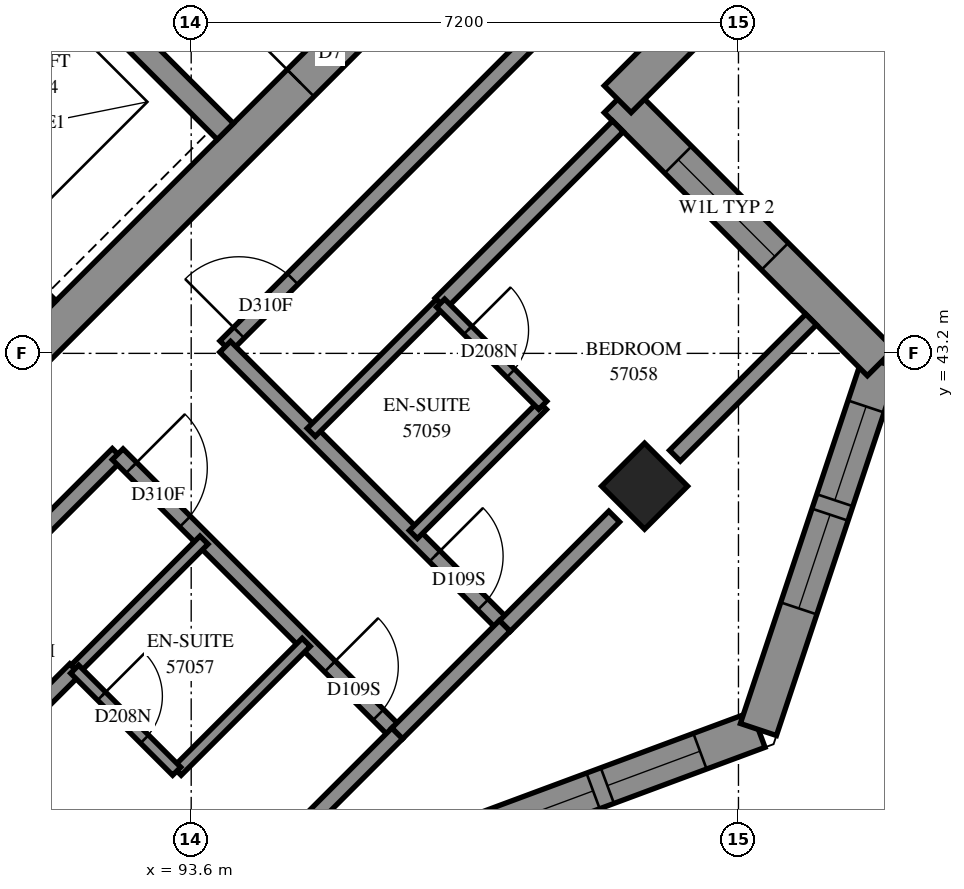
"""IFC4 building model, lengths in metres.
Left out: names, types, materials, properties, quantities, classifications, styles, units other than length and angle.
Written with IfcOpenShell. Run it as: python <this file> out.ifc"""

import sys

from ifc_helpers import new_model, si_unit, direction, frame, frame_2d, origin, origin_2d, place, context, subcontext, project, spatial, polyline, rectangle, outline, extrude, element, fill, save


model = new_model("IFC4")
c1 = context("Model", 3, precision=1e-05, world=origin(), true_north=direction((0.0, 1.0)))
c2 = subcontext(c1, "Body", "Model", "MODEL_VIEW")
j1 = project(units=[si_unit("LENGTHUNIT", "METRE"), si_unit("PLANEANGLEUNIT", "RADIAN")], contexts=[c1])
p1 = place(None, origin())
s1 = spatial("IfcSite", under=j1, at=p1, CompositionType="ELEMENT")
p2 = place(p1, origin())
s2 = spatial("IfcBuilding", under=s1, at=p2, CompositionType="ELEMENT")
p3 = place(p2, frame((0.0, 0.0, 210.0)))
s3 = spatial("IfcBuildingStorey", under=s2, at=p3, CompositionType="ELEMENT", Elevation=210.0)
p4 = place(p3, frame((99.565, 41.453, 0.0), z_axis=(0.0, 0.0, 1.0), x_axis=(0.7071067812, -0.7071067812, 0.0)))
e1 = element("IfcColumn", 1, at=p4, inside=s3, PredefinedType="COLUMN", context=c2, shape_type="SweptSolid", body=[
    extrude(rectangle(XDim=0.8, YDim=0.8, at=origin_2d()), origin(), (0.0, 0.0, 1.0), 3.1),
])
p5 = place(p3, frame((87.013, 38.731, -0.3), z_axis=(0.0, 0.0, 1.0), x_axis=(0.7071067812, 0.7071067812, 0.0)))
e2 = element("IfcWall", 2, at=p5, inside=s3, PredefinedType="SHEAR", context=c2, shape_type="SweptSolid", body=[
    extrude(rectangle(XDim=14.4, YDim=0.5, at=frame_2d((7.2, 0.0))), origin(), (0.0, 0.0, 1.0), 2.7),
])
p6 = place(p5, frame((4.55, 0.0, 0.3)))
e3 = element("IfcOpeningElement", 3, at=p6, cuts=e2, PredefinedType="OPENING", context=c2, shape_type="SweptSolid", body=[
    extrude(rectangle(XDim=1.1, YDim=2.1, at=frame_2d((0.55, 1.05))), frame((0.0, 0.26, 0.0), z_axis=(0.0, -1.0, 0.0), x_axis=(1.0, 0.0, 0.0)), (0.0, 0.0, 1.0), 0.52),
])
p7 = place(p5, frame((11.35, 0.0, 0.3)))
e4 = element("IfcOpeningElement", 4, at=p7, cuts=e2, PredefinedType="OPENING", context=c2, shape_type="SweptSolid", body=[
    extrude(rectangle(XDim=1.1, YDim=2.1, at=frame_2d((0.55, 1.05))), frame((0.0, 0.26, 0.0), z_axis=(0.0, -1.0, 0.0), x_axis=(1.0, 0.0, 0.0)), (0.0, 0.0, 1.0), 0.52),
])
p8 = place(p3, frame((81.534, 53.969, 0.0), z_axis=(0.0, 0.0, 1.0), x_axis=(0.707103309, -0.7071102534, 0.0)))
e5 = element("IfcWall", 5, at=p8, inside=s3, PredefinedType="SOLIDWALL", context=c2, shape_type="SweptSolid", body=[
    extrude(rectangle(XDim=14.4, YDim=0.3, at=frame_2d((7.2, 0.0))), origin(), (0.0, 0.0, 1.0), 3.1),
])
p9 = place(p8, frame((1.25, 0.0, 0.0)))
e6 = element("IfcOpeningElement", 6, at=p9, cuts=e5, PredefinedType="OPENING", context=c2, shape_type="SweptSolid", body=[
    extrude(rectangle(XDim=1.1, YDim=2.1, at=frame_2d((0.55, 1.05))), frame((0.0, 0.16, 0.0), z_axis=(0.0, -1.0, 0.0), x_axis=(1.0, 0.0, 0.0)), (0.0, 0.0, 1.0), 0.32),
])
p10 = place(p8, frame((4.85, 0.0, 0.0)))
e7 = element("IfcOpeningElement", 7, at=p10, cuts=e5, PredefinedType="OPENING", context=c2, shape_type="SweptSolid", body=[
    extrude(rectangle(XDim=1.1, YDim=2.1, at=frame_2d((0.55, 1.05))), frame((0.0, 0.16, 0.0), z_axis=(0.0, -1.0, 0.0), x_axis=(1.0, 0.0, 0.0)), (0.0, 0.0, 1.0), 0.32),
])
p11 = place(p8, frame((8.45, 0.0, 0.0)))
e8 = element("IfcOpeningElement", 8, at=p11, cuts=e5, PredefinedType="OPENING", context=c2, shape_type="SweptSolid", body=[
    extrude(rectangle(XDim=1.1, YDim=2.1, at=frame_2d((0.55, 1.05))), frame((0.0, 0.16, 0.0), z_axis=(0.0, -1.0, 0.0), x_axis=(1.0, 0.0, 0.0)), (0.0, 0.0, 1.0), 0.32),
])
p12 = place(p8, frame((12.05, 0.0, 0.0)))
e9 = element("IfcOpeningElement", 9, at=p12, cuts=e5, PredefinedType="OPENING", context=c2, shape_type="SweptSolid", body=[
    extrude(rectangle(XDim=1.1, YDim=2.1, at=frame_2d((0.55, 1.05))), frame((0.0, 0.16, 0.0), z_axis=(0.0, -1.0, 0.0), x_axis=(1.0, 0.0, 0.0)), (0.0, 0.0, 1.0), 0.32),
])
p13 = place(p3, frame((88.958, 51.211, 0.0), z_axis=(0.0, 0.0, 1.0), x_axis=(0.7070998367, -0.7071137256, 0.0)))
e10 = element("IfcWall", 10, at=p13, inside=s3, PredefinedType="SOLIDWALL", context=c2, shape_type="SweptSolid", body=[
    extrude(rectangle(XDim=7.2, YDim=0.3, at=frame_2d((3.6, 0.0))), origin(), (0.0, 0.0, 1.0), 3.1),
])
p14 = place(p3, frame((96.118, 36.415, 0.0), z_axis=(0.0, 0.0, 1.0), x_axis=(0.9374238577, 0.3481903374, 0.0)))
e11 = element("IfcWall", 11, at=p14, inside=s3, PredefinedType="SOLIDWALL", context=c2, shape_type="SweptSolid", body=[
    extrude(outline(polyline([(0.115, -0.25), (5.395, -0.25), (5.155, 0.25), (-0.115, 0.25), (0.115, -0.25)])), origin(), (0.0, 0.0, 1.0), 3.1),
])
p15 = place(p14, frame((1.655, 0.0, 0.45)))
e12 = element("IfcOpeningElement", 12, at=p15, cuts=e11, PredefinedType="OPENING", context=c2, shape_type="SweptSolid", body=[
    extrude(rectangle(XDim=1.3, YDim=2.5, at=frame_2d((0.65, 1.25))), frame((0.0, 0.26, 0.0), z_axis=(0.0, -1.0, 0.0), x_axis=(1.0, 0.0, 0.0)), (0.0, 0.0, 1.0), 0.52),
])
p16 = place(p14, frame((3.155, 0.0, 0.45)))
e13 = element("IfcOpeningElement", 13, at=p16, cuts=e11, PredefinedType="OPENING", context=c2, shape_type="SweptSolid", body=[
    extrude(rectangle(XDim=1.3, YDim=2.5, at=frame_2d((0.65, 1.25))), frame((0.0, 0.26, 0.0), z_axis=(0.0, -1.0, 0.0), x_axis=(1.0, 0.0, 0.0)), (0.0, 0.0, 1.0), 0.52),
])
p17 = place(p3, frame((101.062, 38.252, 0.0), z_axis=(0.0, 0.0, 1.0), x_axis=(0.3162395484, 0.9486793705, 0.0)))
e14 = element("IfcWall", 14, at=p17, inside=s3, PredefinedType="SOLIDWALL", context=c2, shape_type="SweptSolid", body=[
    extrude(outline(polyline([(-0.12, -0.25), (5.247, -0.25), (4.938, 0.25), (0.12, 0.25), (-0.12, -0.25)])), origin(), (0.0, 0.0, 1.0), 3.1),
])
p18 = place(p17, frame((1.68, 0.0, 0.45)))
e15 = element("IfcOpeningElement", 15, at=p18, cuts=e14, PredefinedType="OPENING", context=c2, shape_type="SweptSolid", body=[
    extrude(rectangle(XDim=1.3, YDim=2.5, at=frame_2d((0.65, 1.25))), frame((0.0, 0.26, 0.0), z_axis=(0.0, -1.0, 0.0), x_axis=(1.0, 0.0, 0.0)), (0.0, 0.0, 1.0), 0.52),
])
p19 = place(p17, frame((3.18, 0.0, 0.45)))
e16 = element("IfcOpeningElement", 16, at=p19, cuts=e14, PredefinedType="OPENING", context=c2, shape_type="SweptSolid", body=[
    extrude(rectangle(XDim=1.3, YDim=2.5, at=frame_2d((0.65, 1.25))), frame((0.0, 0.26, 0.0), z_axis=(0.0, -1.0, 0.0), x_axis=(1.0, 0.0, 0.0)), (0.0, 0.0, 1.0), 0.52),
])
p20 = place(p3, frame((102.673, 43.083, 0.0), z_axis=(0.0, 0.0, 1.0), x_axis=(-0.7071067812, 0.7071067812, 0.0)))
e17 = element("IfcWall", 17, at=p20, inside=s3, PredefinedType="SOLIDWALL", context=c2, shape_type="SweptSolid", body=[
    extrude(outline(polyline([(-0.154, -0.25), (4.646, -0.25), (5.146, 0.25), (0.154, 0.25), (-0.154, -0.25)])), origin(), (0.0, 0.0, 1.0), 3.1),
])
p21 = place(p20, frame((1.97, 0.0, 0.6)))
e18 = element("IfcOpeningElement", 18, at=p21, cuts=e17, PredefinedType="OPENING", context=c2, shape_type="SweptSolid", body=[
    extrude(rectangle(XDim=1.8, YDim=1.9, at=frame_2d((0.9, 0.95))), frame((0.0, 0.26, 0.0), z_axis=(0.0, -1.0, 0.0), x_axis=(1.0, 0.0, 0.0)), (0.0, 0.0, 1.0), 0.52),
])
p22 = place(p3, frame((99.211, 46.544, 0.0), z_axis=(0.0, 0.0, 1.0), x_axis=(0.7071067812, 0.7071067812, 0.0)))
e19 = element("IfcWall", 19, at=p22, inside=s3, PredefinedType="SOLIDWALL", context=c2, shape_type="SweptSolid", body=[
    extrude(outline(polyline([(0.25, -0.25), (6.132, -0.25), (5.444, 0.25), (-0.25, 0.25), (0.25, -0.25)])), origin(), (0.0, 0.0, 1.0), 3.1),
])
p23 = place(p22, frame((1.125, 0.0, 0.6)))
e20 = element("IfcOpeningElement", 20, at=p23, cuts=e19, PredefinedType="OPENING", context=c2, shape_type="SweptSolid", body=[
    extrude(rectangle(XDim=1.8, YDim=1.9, at=frame_2d((0.9, 0.95))), frame((0.0, 0.26, 0.0), z_axis=(0.0, -1.0, 0.0), x_axis=(1.0, 0.0, 0.0)), (0.0, 0.0, 1.0), 0.52),
])
p24 = place(p3, frame((85.002, 31.976, 0.0), z_axis=(0.0, 0.0, 1.0), x_axis=(0.7072267874, 0.7069867546, 0.0)))
e21 = element("IfcWall", 21, at=p24, inside=s3, PredefinedType="PARTITIONING", context=c2, shape_type="SweptSolid", body=[
    extrude(rectangle(XDim=9.999, YDim=0.2, at=frame_2d((4.999, 0.0))), origin(), (0.0, 0.0, 1.0), 3.1),
])
p25 = place(p3, frame((94.049, 43.293, 0.0), z_axis=(0.0, 0.0, 1.0), x_axis=(0.7071067812, 0.7071067812, 0.0)))
e22 = element("IfcWall", 22, at=p25, inside=s3, PredefinedType="PARTITIONING", context=c2, shape_type="SweptSolid", body=[
    extrude(rectangle(XDim=8.2, YDim=0.2, at=frame_2d((4.1, 0.0))), origin(), (0.0, 0.0, 1.0), 3.1),
])
p26 = place(p25, frame((0.252, 0.0, 0.0)))
e23 = element("IfcOpeningElement", 23, at=p26, cuts=e22, PredefinedType="OPENING", context=c2, shape_type="SweptSolid", body=[
    extrude(rectangle(XDim=1.0, YDim=2.1, at=frame_2d((0.5, 1.05))), frame((0.0, 0.11, 0.0), z_axis=(0.0, -1.0, 0.0), x_axis=(1.0, 0.0, 0.0)), (0.0, 0.0, 1.0), 0.22),
])
p27 = place(p3, frame((86.835, 36.079, 0.0), z_axis=(0.0, 0.0, 1.0), x_axis=(0.7071067812, 0.7071067812, 0.0)))
e24 = element("IfcWall", 24, at=p27, inside=s3, PredefinedType="PARTITIONING", context=c2, shape_type="SweptSolid", body=[
    extrude(rectangle(XDim=8.2, YDim=0.2, at=frame_2d((4.1, 0.0))), origin(), (0.0, 0.0, 1.0), 3.1),
])
p28 = place(p3, frame((94.047, 43.287, 0.0), z_axis=(0.0, 0.0, 1.0), x_axis=(0.7071067812, -0.7071067812, 0.0)))
e25 = element("IfcWall", 25, at=p28, inside=s3, PredefinedType="PARTITIONING", context=c2, shape_type="SweptSolid", body=[
    extrude(rectangle(XDim=5.199, YDim=0.2, at=frame_2d((2.599, 0.0))), origin(), (0.0, 0.0, 1.0), 3.1),
])
p29 = place(p28, frame((3.898, 0.0, 0.0)))
e26 = element("IfcOpeningElement", 26, at=p29, cuts=e25, PredefinedType="OPENING", context=c2, shape_type="SweptSolid", body=[
    extrude(rectangle(XDim=0.9, YDim=2.1, at=frame_2d((0.45, 1.05))), frame((0.0, 0.11, 0.0), z_axis=(0.0, -1.0, 0.0), x_axis=(1.0, 0.0, 0.0)), (0.0, 0.0, 1.0), 0.22),
])
p30 = place(p3, frame((92.633, 41.873, 0.0), z_axis=(0.0, 0.0, 1.0), x_axis=(0.7071067812, -0.7071067812, 0.0)))
e27 = element("IfcWall", 27, at=p30, inside=s3, PredefinedType="PARTITIONING", context=c2, shape_type="SweptSolid", body=[
    extrude(rectangle(XDim=5.199, YDim=0.2, at=frame_2d((2.599, 0.0))), origin(), (0.0, 0.0, 1.0), 3.1),
])
p31 = place(p30, frame((0.253, 0.0, 0.0)))
e28 = element("IfcOpeningElement", 28, at=p31, cuts=e27, PredefinedType="OPENING", context=c2, shape_type="SweptSolid", body=[
    extrude(rectangle(XDim=1.0, YDim=2.1, at=frame_2d((0.5, 1.05))), frame((0.0, 0.11, 0.0), z_axis=(0.0, -1.0, 0.0), x_axis=(1.0, 0.0, 0.0)), (0.0, 0.0, 1.0), 0.22),
])
p32 = place(p30, frame((3.948, 0.0, 0.0)))
e29 = element("IfcOpeningElement", 29, at=p32, cuts=e27, PredefinedType="OPENING", context=c2, shape_type="SweptSolid", body=[
    extrude(rectangle(XDim=0.9, YDim=2.1, at=frame_2d((0.45, 1.05))), frame((0.0, 0.11, 0.0), z_axis=(0.0, -1.0, 0.0), x_axis=(1.0, 0.0, 0.0)), (0.0, 0.0, 1.0), 0.22),
])
p33 = place(p3, frame((96.88, 43.856, 0.0), z_axis=(0.0, 0.0, 1.0), x_axis=(0.7074098182, 0.7068036142, 0.0)))
e30 = element("IfcWall", 30, at=p33, inside=s3, PredefinedType="PARTITIONING", context=c2, shape_type="SweptSolid", body=[
    extrude(rectangle(XDim=3.299, YDim=0.2, at=frame_2d((1.65, 0.0))), origin(), (0.0, 0.0, 1.0), 3.1),
])
p34 = place(p3, frame((99.964, 41.854, 0.0), z_axis=(0.0, 0.0, 1.0), x_axis=(0.7071265121, 0.7070870497, 0.0)))
e31 = element("IfcWall", 31, at=p34, inside=s3, PredefinedType="PARTITIONING", context=c2, shape_type="SweptSolid", body=[
    extrude(rectangle(XDim=2.534, YDim=0.2, at=frame_2d((1.267, 0.0))), origin(), (0.0, 0.0, 1.0), 3.1),
])
for number, where, z_axis, x_axis in (
    (32, (96.523, 40.817, 0.0), (0.0, 0.0, 1.0), (0.707, 0.707, 0.0)),
    (33, (95.179, 42.161, 0.0), (0.0, 0.0, 1.0), (0.707, 0.707, 0.0)),
):
    element("IfcWall", number, at=place(p3, frame(where, z_axis=z_axis, x_axis=x_axis)), inside=s3, PredefinedType="PARTITIONING", context=c2, shape_type="SweptSolid", body=[
        extrude(rectangle(XDim=2.401, YDim=0.15, at=frame_2d((1.201, 0.0))), origin(), (0.0, 0.0, 1.0), 3.1),
    ])
for number, where, z_axis, x_axis in (
    (34, (92.072, 39.046, 0.0), (0.0, 0.0, 1.0), (0.707, 0.708, 0.0)),
    (35, (93.415, 37.703, 0.0), (0.0, 0.0, 1.0), (0.708, 0.707, 0.0)),
):
    element("IfcWall", number, at=place(p3, frame(where, z_axis=z_axis, x_axis=x_axis)), inside=s3, PredefinedType="PARTITIONING", context=c2, shape_type="SweptSolid", body=[
        extrude(rectangle(XDim=2.4, YDim=0.15, at=frame_2d((1.2, 0.0))), origin(), (0.0, 0.0, 1.0), 3.1),
    ])
p35 = place(p3, frame((97.727, 39.613, 0.0), z_axis=(0.0, 0.0, 1.0), x_axis=(0.7066152229, 0.7075979979, 0.0)))
e36 = element("IfcWall", 36, at=p35, inside=s3, PredefinedType="PARTITIONING", context=c2, shape_type="SweptSolid", body=[
    extrude(rectangle(XDim=2.035, YDim=0.2, at=frame_2d((1.018, 0.0))), origin(), (0.0, 0.0, 1.0), 2.6),
])
p36 = place(p3, frame((94.873, 36.763, 0.0), z_axis=(0.0, 0.0, 1.0), x_axis=(0.7071067812, 0.7071067812, 0.0)))
e37 = element("IfcWall", 37, at=p36, inside=s3, PredefinedType="PARTITIONING", context=c2, shape_type="SweptSolid", body=[
    extrude(rectangle(XDim=2.034, YDim=0.2, at=frame_2d((1.017, 0.0))), origin(), (0.0, 0.0, 1.0), 2.6),
])
p37 = place(p3, frame((96.311, 38.201, 0.0), z_axis=(0.0, 0.0, 1.0), x_axis=(0.7071067812, 0.7071067812, 0.0)))
e38 = element("IfcWall", 38, at=p37, inside=s3, PredefinedType="PARTITIONING", context=c2, shape_type="SweptSolid", body=[
    extrude(rectangle(XDim=2.0, YDim=0.2, at=frame_2d((1.0, 0.0))), origin(), (0.0, 0.0, 1.0), 2.6),
])
p38 = place(p3, frame((96.881, 43.861, 0.0), z_axis=(0.0, 0.0, 1.0), x_axis=(0.7071067812, -0.7071067812, 0.0)))
e39 = element("IfcWall", 39, at=p38, inside=s3, PredefinedType="PARTITIONING", context=c2, shape_type="SweptSolid", body=[
    extrude(rectangle(XDim=1.901, YDim=0.15, at=frame_2d((0.95, 0.0))), origin(), (0.0, 0.0, 1.0), 3.1),
])
p39 = place(p38, frame((0.505, 0.0, 0.0)))
e40 = element("IfcOpeningElement", 40, at=p39, cuts=e39, PredefinedType="OPENING", context=c2, shape_type="SweptSolid", body=[
    extrude(rectangle(XDim=0.8, YDim=2.1, at=frame_2d((0.4, 1.05))), frame((0.0, 0.085, 0.0), z_axis=(0.0, -1.0, 0.0), x_axis=(1.0, 0.0, 0.0)), (0.0, 0.0, 1.0), 0.17),
])
p40 = place(p3, frame((92.067, 39.045, 0.0), z_axis=(0.0, 0.0, 1.0), x_axis=(0.7071067812, -0.7071067812, 0.0)))
e41 = element("IfcWall", 41, at=p40, inside=s3, PredefinedType="PARTITIONING", context=c2, shape_type="SweptSolid", body=[
    extrude(rectangle(XDim=1.898, YDim=0.15, at=frame_2d((0.949, 0.0))), origin(), (0.0, 0.0, 1.0), 3.1),
])
p41 = place(p40, frame((0.501, 0.0, 0.0)))
e42 = element("IfcOpeningElement", 42, at=p41, cuts=e41, PredefinedType="OPENING", context=c2, shape_type="SweptSolid", body=[
    extrude(rectangle(XDim=0.8, YDim=2.1, at=frame_2d((0.4, 1.05))), frame((0.0, 0.085, 0.0), z_axis=(0.0, -1.0, 0.0), x_axis=(1.0, 0.0, 0.0)), (0.0, 0.0, 1.0), 0.17),
])
p42 = place(p15, origin())
e43 = element("IfcWindow", 43, at=p42, inside=s3, PartitioningType="SINGLE_PANEL", PredefinedType="WINDOW", context=c2, shape_type="SweptSolid", body=[
    extrude(rectangle(XDim=1.3, YDim=2.5, at=frame_2d((0.65, 1.25))), frame((0.0, 0.18, 0.0), z_axis=(0.0, -1.0, 0.0), x_axis=(1.0, 0.0, 0.0)), (0.0, 0.0, 1.0), 0.06),
])
fill(e12, e43)
p43 = place(p16, origin())
e44 = element("IfcWindow", 44, at=p43, inside=s3, PartitioningType="SINGLE_PANEL", PredefinedType="WINDOW", context=c2, shape_type="SweptSolid", body=[
    extrude(rectangle(XDim=1.3, YDim=2.5, at=frame_2d((0.65, 1.25))), frame((0.0, 0.18, 0.0), z_axis=(0.0, -1.0, 0.0), x_axis=(1.0, 0.0, 0.0)), (0.0, 0.0, 1.0), 0.06),
])
fill(e13, e44)
p44 = place(p18, origin())
e45 = element("IfcWindow", 45, at=p44, inside=s3, PartitioningType="SINGLE_PANEL", PredefinedType="WINDOW", context=c2, shape_type="SweptSolid", body=[
    extrude(rectangle(XDim=1.3, YDim=2.5, at=frame_2d((0.65, 1.25))), frame((0.0, 0.18, 0.0), z_axis=(0.0, -1.0, 0.0), x_axis=(1.0, 0.0, 0.0)), (0.0, 0.0, 1.0), 0.06),
])
fill(e15, e45)
p45 = place(p19, origin())
e46 = element("IfcWindow", 46, at=p45, inside=s3, PartitioningType="SINGLE_PANEL", PredefinedType="WINDOW", context=c2, shape_type="SweptSolid", body=[
    extrude(rectangle(XDim=1.3, YDim=2.5, at=frame_2d((0.65, 1.25))), frame((0.0, 0.18, 0.0), z_axis=(0.0, -1.0, 0.0), x_axis=(1.0, 0.0, 0.0)), (0.0, 0.0, 1.0), 0.06),
])
fill(e16, e46)
p46 = place(p21, origin())
e47 = element("IfcWindow", 47, at=p46, inside=s3, PartitioningType="SINGLE_PANEL", PredefinedType="WINDOW", context=c2, shape_type="SweptSolid", body=[
    extrude(rectangle(XDim=1.8, YDim=1.9, at=frame_2d((0.9, 0.95))), frame((0.0, 0.18, 0.0), z_axis=(0.0, -1.0, 0.0), x_axis=(1.0, 0.0, 0.0)), (0.0, 0.0, 1.0), 0.06),
])
fill(e18, e47)
p47 = place(p7, origin())
e48 = element("IfcDoor", 48, at=p47, inside=s3, OperationType="SINGLE_SWING_RIGHT", PredefinedType="DOOR", context=c2, shape_type="SweptSolid", body=[
    extrude(rectangle(XDim=1.1, YDim=2.1, at=frame_2d((0.55, 1.05))), frame((0.0, 0.025, 0.0), z_axis=(0.0, -1.0, 0.0), x_axis=(1.0, 0.0, 0.0)), (0.0, 0.0, 1.0), 0.05),
])
fill(e4, e48)
p48 = place(p26, origin())
e49 = element("IfcDoor", 49, at=p48, inside=s3, OperationType="SINGLE_SWING_RIGHT", PredefinedType="DOOR", context=c2, shape_type="SweptSolid", body=[
    extrude(rectangle(XDim=1.0, YDim=2.1, at=frame_2d((0.5, 1.05))), frame((0.0, 0.025, 0.0), z_axis=(0.0, -1.0, 0.0), x_axis=(1.0, 0.0, 0.0)), (0.0, 0.0, 1.0), 0.05),
])
fill(e23, e49)
p49 = place(p31, origin())
e50 = element("IfcDoor", 50, at=p49, inside=s3, OperationType="SINGLE_SWING_RIGHT", PredefinedType="DOOR", context=c2, shape_type="SweptSolid", body=[
    extrude(rectangle(XDim=1.0, YDim=2.1, at=frame_2d((0.5, 1.05))), frame((0.0, 0.025, 0.0), z_axis=(0.0, -1.0, 0.0), x_axis=(1.0, 0.0, 0.0)), (0.0, 0.0, 1.0), 0.05),
])
fill(e28, e50)
p50 = place(p32, origin())
e51 = element("IfcDoor", 51, at=p50, inside=s3, OperationType="SINGLE_SWING_LEFT", PredefinedType="DOOR", context=c2, shape_type="SweptSolid", body=[
    extrude(rectangle(XDim=0.9, YDim=2.1, at=frame_2d((0.45, 1.05))), frame((0.0, 0.025, 0.0), z_axis=(0.0, -1.0, 0.0), x_axis=(1.0, 0.0, 0.0)), (0.0, 0.0, 1.0), 0.05),
])
fill(e29, e51)
p51 = place(p41, origin())
e52 = element("IfcDoor", 52, at=p51, inside=s3, OperationType="SINGLE_SWING_RIGHT", PredefinedType="DOOR", context=c2, shape_type="SweptSolid", body=[
    extrude(rectangle(XDim=0.8, YDim=2.1, at=frame_2d((0.4, 1.05))), frame((0.0, 0.025, 0.0), z_axis=(0.0, -1.0, 0.0), x_axis=(1.0, 0.0, 0.0)), (0.0, 0.0, 1.0), 0.05),
])
fill(e42, e52)
p52 = place(p29, origin())
e53 = element("IfcDoor", 53, at=p52, inside=s3, OperationType="SINGLE_SWING_RIGHT", PredefinedType="DOOR", context=c2, shape_type="SweptSolid", body=[
    extrude(rectangle(XDim=0.9, YDim=2.1, at=frame_2d((0.45, 1.05))), frame((0.0, 0.025, 0.0), z_axis=(0.0, -1.0, 0.0), x_axis=(1.0, 0.0, 0.0)), (0.0, 0.0, 1.0), 0.05),
])
fill(e26, e53)
p53 = place(p39, origin())
e54 = element("IfcDoor", 54, at=p53, inside=s3, OperationType="SINGLE_SWING_RIGHT", PredefinedType="DOOR", context=c2, shape_type="SweptSolid", body=[
    extrude(rectangle(XDim=0.8, YDim=2.1, at=frame_2d((0.4, 1.05))), frame((0.0, 0.025, 0.0), z_axis=(0.0, -1.0, 0.0), x_axis=(1.0, 0.0, 0.0)), (0.0, 0.0, 1.0), 0.05),
])
fill(e40, e54)
save(model, sys.argv[1])
